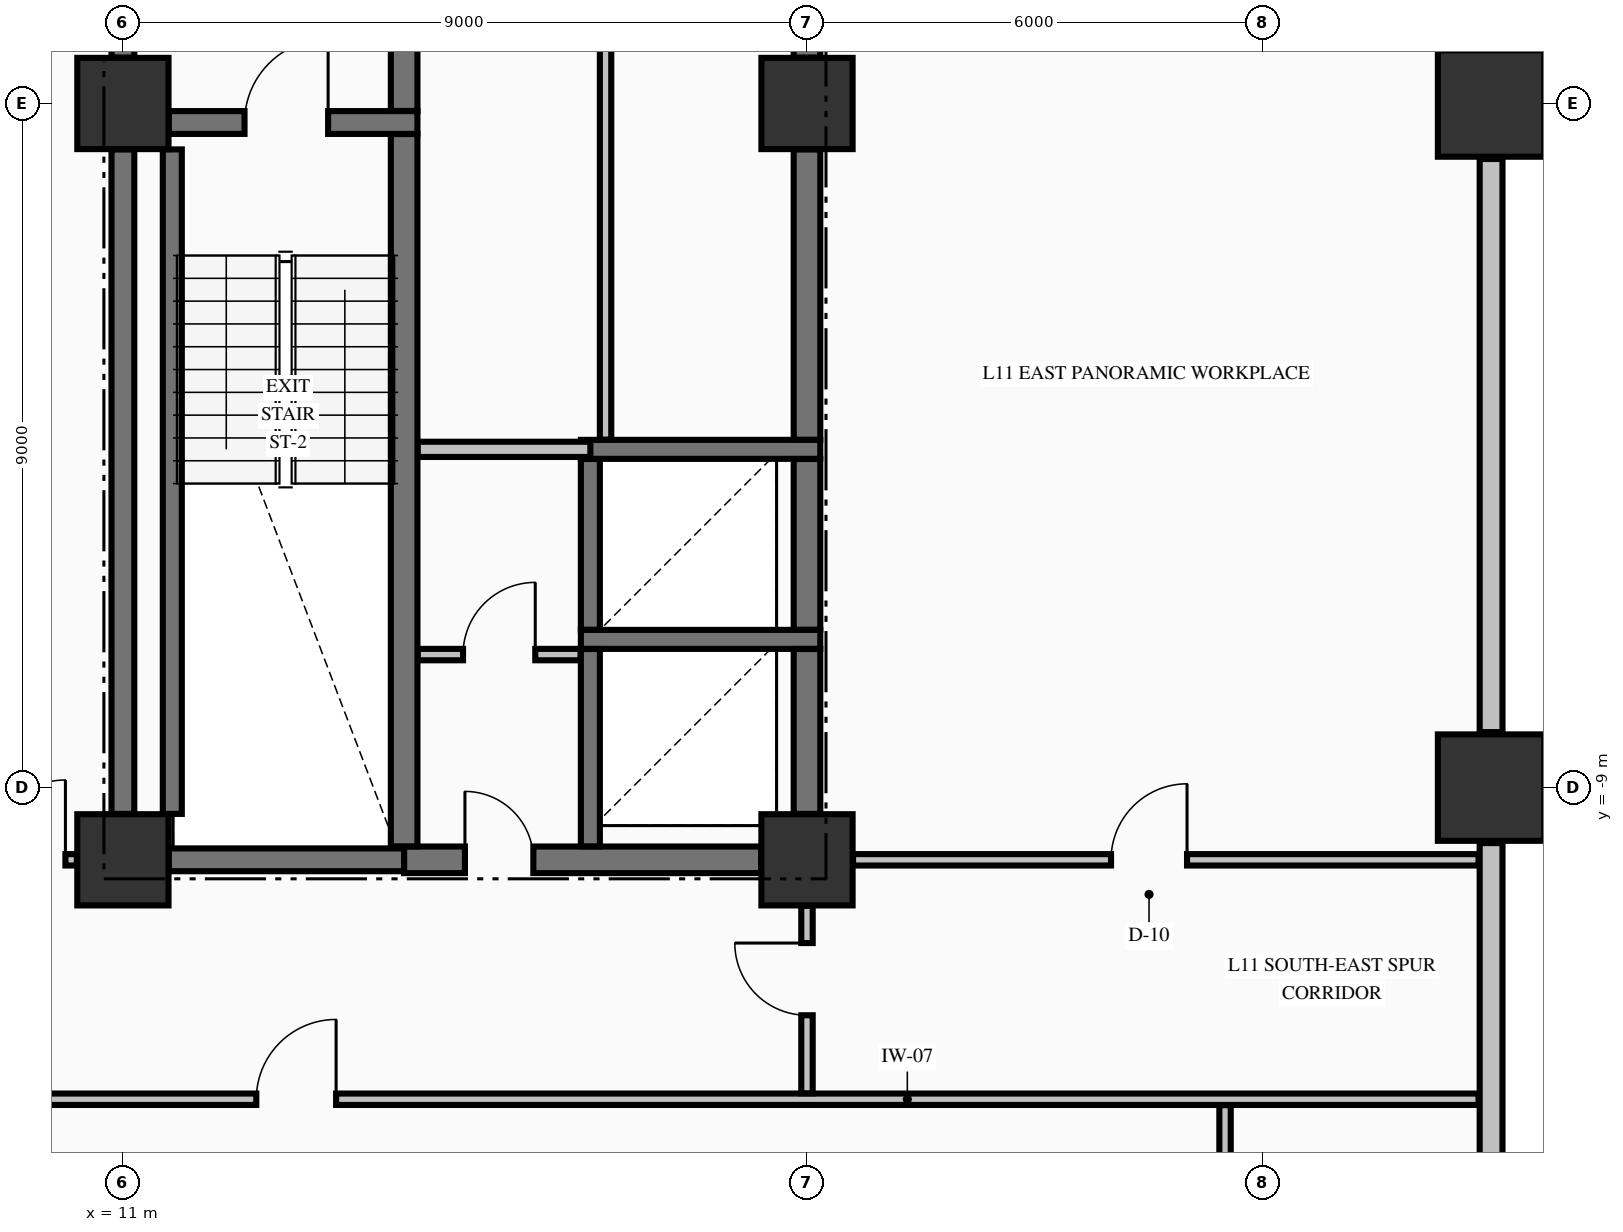
"""IFC4 building model, lengths in metres.
Left out: names, types, materials, properties, quantities, classifications, styles, units other than length and angle.
Written with IfcOpenShell. Run it as: python <this file> out.ifc"""

import sys

from ifc_helpers import new_model, si_unit, direction, frame, frame_2d, origin, origin_2d, place, context, subcontext, project, spatial, rectangle, extrude, element, fill, save


model = new_model("IFC4")
c1 = context("Model", 3, precision=1e-05, world=origin(), true_north=direction((0.0, 1.0)))
c2 = subcontext(c1, "Body", "Model", "MODEL_VIEW")
j1 = project(units=[si_unit("LENGTHUNIT", "METRE"), si_unit("PLANEANGLEUNIT", "RADIAN")], contexts=[c1])
p1 = place(None, origin())
s1 = spatial("IfcSite", under=j1, at=p1, CompositionType="ELEMENT")
p2 = place(p1, origin())
s2 = spatial("IfcBuilding", under=s1, at=p2, CompositionType="ELEMENT")
p3 = place(p2, frame((0.0, 0.0, 48.62)))
s3 = spatial("IfcBuildingStorey", under=s2, at=p3, CompositionType="ELEMENT", Elevation=48.62)
for number, where, z_axis, x_axis in (
    (1, (29.0, -9.0, -0.25), (0.0, 0.0, 1.0), (1.0, 0.0, 0.0)),
    (2, (29.0, 0.0, -0.25), (0.0, 0.0, 1.0), (1.0, 0.0, 0.0)),
):
    element("IfcColumn", number, at=place(p3, frame(where, z_axis=z_axis, x_axis=x_axis)), inside=s3, PredefinedType="COLUMN", context=c2, shape_type="SweptSolid", body=[
        extrude(rectangle(XDim=1.4, YDim=1.4, at=origin_2d()), origin(), (0.0, 0.0, 1.0), 3.395),
    ])
for number, where, z_axis, x_axis in (
    (3, (11.0, -9.95, -0.25), (0.0, 0.0, 1.0), (1.0, 0.0, 0.0)),
    (4, (11.0, 0.0, -0.25), (0.0, 0.0, 1.0), (1.0, 0.0, 0.0)),
    (5, (20.0, -9.95, -0.25), (0.0, 0.0, 1.0), (1.0, 0.0, 0.0)),
    (6, (20.0, 0.0, -0.25), (0.0, 0.0, 1.0), (1.0, 0.0, 0.0)),
):
    element("IfcColumn", number, at=place(p3, frame(where, z_axis=z_axis, x_axis=x_axis)), inside=s3, PredefinedType="COLUMN", context=c2, shape_type="SweptSolid", body=[
        extrude(rectangle(XDim=1.2, YDim=1.2, at=origin_2d()), origin(), (0.0, 0.0, 1.0), 3.395),
    ])
p4 = place(p3, frame((29.0, -22.27, 0.0), z_axis=(0.0, 0.0, 1.0), x_axis=(0.0, 1.0, 0.0)))
e7 = element("IfcWall", 7, at=p4, inside=s3, PredefinedType="STANDARD", context=c2, shape_type="SweptSolid", body=[
    extrude(rectangle(XDim=12.54, YDim=0.3, at=frame_2d((6.27, 0.0))), origin(), (0.0, 0.0, 1.0), 2.537),
])
p5 = place(p3, frame((29.0, -8.27, 0.0), z_axis=(0.0, 0.0, 1.0), x_axis=(0.0, 1.0, 0.0)))
e8 = element("IfcWall", 8, at=p5, inside=s3, PredefinedType="STANDARD", context=c2, shape_type="SweptSolid", body=[
    extrude(rectangle(XDim=7.54, YDim=0.3, at=frame_2d((3.77, 0.0))), origin(), (0.0, 0.0, 1.0), 2.537),
])
p6 = place(p3, frame((11.604, -9.95, 0.0), z_axis=(0.0, 0.0, 1.0), x_axis=(1.0, 0.0, 0.0)))
e9 = element("IfcWall", 9, at=p6, inside=s3, PredefinedType="SHEAR", context=c2, shape_type="SweptSolid", body=[
    extrude(rectangle(XDim=3.096, YDim=0.3, at=frame_2d((1.548, 0.0))), origin(), (0.0, 0.0, 1.0), 3.145),
])
p7 = place(p3, frame((14.7, -9.95, 0.0), z_axis=(0.0, 0.0, 1.0), x_axis=(1.0, 0.0, 0.0)))
e10 = element("IfcWall", 10, at=p7, inside=s3, PredefinedType="SHEAR", context=c2, shape_type="SweptSolid", body=[
    extrude(rectangle(XDim=4.696, YDim=0.35, at=frame_2d((2.348, 0.0))), origin(), (0.0, 0.0, 1.0), 3.145),
])
p8 = place(p7, frame((0.8, 0.0, 0.0)))
e11 = element("IfcOpeningElement", 11, at=p8, cuts=e10, PredefinedType="OPENING", context=c2, shape_type="SweptSolid", body=[
    extrude(rectangle(XDim=0.9, YDim=2.15, at=frame_2d((0.45, 1.075))), frame((0.0, 0.185, 0.0), z_axis=(0.0, -1.0, 0.0), x_axis=(1.0, 0.0, 0.0)), (0.0, 0.0, 1.0), 0.37),
])
for number, where, z_axis, x_axis in (
    (12, (17.025, -7.05, 0.0), (0.0, 0.0, 1.0), (1.0, 0.0, 0.0)),
    (13, (17.025, -4.55, 0.0), (0.0, 0.0, 1.0), (1.0, 0.0, 0.0)),
):
    element("IfcWall", number, at=place(p3, frame(where, z_axis=z_axis, x_axis=x_axis)), inside=s3, PredefinedType="SOLIDWALL", context=c2, shape_type="SweptSolid", body=[
        extrude(rectangle(XDim=3.15, YDim=0.25, at=frame_2d((1.575, 0.0))), origin(), (0.0, 0.0, 1.0), 3.145),
    ])
p9 = place(p3, frame((11.604, -0.25, 0.0), z_axis=(0.0, 0.0, 1.0), x_axis=(1.0, 0.0, 0.0)))
e14 = element("IfcWall", 14, at=p9, inside=s3, PredefinedType="SHEAR", context=c2, shape_type="SweptSolid", body=[
    extrude(rectangle(XDim=3.271, YDim=0.3, at=frame_2d((1.635, 0.0))), origin(), (0.0, 0.0, 1.0), 3.145),
])
p10 = place(p9, frame((0.996, 0.0, 0.0)))
e15 = element("IfcOpeningElement", 15, at=p10, cuts=e14, PredefinedType="OPENING", context=c2, shape_type="SweptSolid", body=[
    extrude(rectangle(XDim=1.1, YDim=2.15, at=frame_2d((0.55, 1.075))), frame((0.0, 0.16, 0.0), z_axis=(0.0, -1.0, 0.0), x_axis=(1.0, 0.0, 0.0)), (0.0, 0.0, 1.0), 0.32),
])
p11 = place(p3, frame((-23.835, -13.1, 0.0), z_axis=(0.0, 0.0, 1.0), x_axis=(1.0, 0.0, 0.0)))
e16 = element("IfcWall", 16, at=p11, inside=s3, PredefinedType="PARTITIONING", context=c2, shape_type="SweptSolid", body=[
    extrude(rectangle(XDim=52.67, YDim=0.15, at=frame_2d((26.335, 0.0))), origin(), (0.0, 0.0, 1.0), 3.145),
])
p12 = place(p11, frame((6.99, 0.0, 0.0)))
e17 = element("IfcOpeningElement", 17, at=p12, cuts=e16, PredefinedType="OPENING", context=c2, shape_type="SweptSolid", body=[
    extrude(rectangle(XDim=1.05, YDim=2.15, at=frame_2d((0.525, 1.075))), frame((0.0, 0.085, 0.0), z_axis=(0.0, -1.0, 0.0), x_axis=(1.0, 0.0, 0.0)), (0.0, 0.0, 1.0), 0.17),
])
p13 = place(p11, frame((15.26, 0.0, 0.0)))
e18 = element("IfcOpeningElement", 18, at=p13, cuts=e16, PredefinedType="OPENING", context=c2, shape_type="SweptSolid", body=[
    extrude(rectangle(XDim=1.05, YDim=2.15, at=frame_2d((0.525, 1.075))), frame((0.0, 0.085, 0.0), z_axis=(0.0, -1.0, 0.0), x_axis=(1.0, 0.0, 0.0)), (0.0, 0.0, 1.0), 0.17),
])
p14 = place(p11, frame((25.06, 0.0, 0.0)))
e19 = element("IfcOpeningElement", 19, at=p14, cuts=e16, PredefinedType="OPENING", context=c2, shape_type="SweptSolid", body=[
    extrude(rectangle(XDim=1.05, YDim=2.15, at=frame_2d((0.525, 1.075))), frame((0.0, 0.085, 0.0), z_axis=(0.0, -1.0, 0.0), x_axis=(1.0, 0.0, 0.0)), (0.0, 0.0, 1.0), 0.17),
])
p15 = place(p11, frame((36.59, 0.0, 0.0)))
e20 = element("IfcOpeningElement", 20, at=p15, cuts=e16, PredefinedType="OPENING", context=c2, shape_type="SweptSolid", body=[
    extrude(rectangle(XDim=1.05, YDim=2.15, at=frame_2d((0.525, 1.075))), frame((0.0, 0.085, 0.0), z_axis=(0.0, -1.0, 0.0), x_axis=(1.0, 0.0, 0.0)), (0.0, 0.0, 1.0), 0.17),
])
p16 = place(p3, frame((-10.394, -9.95, 0.0), z_axis=(0.0, 0.0, 1.0), x_axis=(1.0, 0.0, 0.0)))
e21 = element("IfcWall", 21, at=p16, inside=s3, PredefinedType="PARTITIONING", context=c2, shape_type="SweptSolid", body=[
    extrude(rectangle(XDim=20.788, YDim=0.15, at=frame_2d((10.394, 0.0))), origin(), (0.0, 0.0, 1.0), 3.145),
])
p17 = place(p16, frame((0.15, 0.0, 0.0)))
e22 = element("IfcOpeningElement", 22, at=p17, cuts=e21, PredefinedType="OPENING", context=c2, shape_type="SweptSolid", body=[
    extrude(rectangle(XDim=1.05, YDim=2.15, at=frame_2d((0.525, 1.075))), frame((0.0, 0.085, 0.0), z_axis=(0.0, -1.0, 0.0), x_axis=(1.0, 0.0, 0.0)), (0.0, 0.0, 1.0), 0.17),
])
p18 = place(p16, frame((19.588, 0.0, 0.0)))
e23 = element("IfcOpeningElement", 23, at=p18, cuts=e21, PredefinedType="OPENING", context=c2, shape_type="SweptSolid", body=[
    extrude(rectangle(XDim=1.05, YDim=2.15, at=frame_2d((0.525, 1.075))), frame((0.0, 0.085, 0.0), z_axis=(0.0, -1.0, 0.0), x_axis=(1.0, 0.0, 0.0)), (0.0, 0.0, 1.0), 0.17),
])
p19 = place(p16, frame((12.669, 0.0, 0.0)))
e24 = element("IfcOpeningElement", 24, at=p19, cuts=e21, PredefinedType="OPENING", context=c2, shape_type="SweptSolid", body=[
    extrude(rectangle(XDim=0.95, YDim=2.15, at=frame_2d((0.475, 1.075))), frame((0.0, 0.085, 0.0), z_axis=(0.0, -1.0, 0.0), x_axis=(1.0, 0.0, 0.0)), (0.0, 0.0, 1.0), 0.17),
])
p20 = place(p3, frame((20.606, -9.95, 0.0), z_axis=(0.0, 0.0, 1.0), x_axis=(1.0, 0.0, 0.0)))
e25 = element("IfcWall", 25, at=p20, inside=s3, PredefinedType="PARTITIONING", context=c2, shape_type="SweptSolid", body=[
    extrude(rectangle(XDim=8.229, YDim=0.15, at=frame_2d((4.115, 0.0))), origin(), (0.0, 0.0, 1.0), 3.145),
])
p21 = place(p20, frame((3.394, 0.0, 0.0)))
e26 = element("IfcOpeningElement", 26, at=p21, cuts=e25, PredefinedType="OPENING", context=c2, shape_type="SweptSolid", body=[
    extrude(rectangle(XDim=1.0, YDim=2.15, at=frame_2d((0.5, 1.075))), frame((0.0, 0.085, 0.0), z_axis=(0.0, -1.0, 0.0), x_axis=(1.0, 0.0, 0.0)), (0.0, 0.0, 1.0), 0.17),
])
p22 = place(p3, frame((14.878, -7.25, 0.0), z_axis=(0.0, 0.0, 1.0), x_axis=(1.0, 0.0, 0.0)))
e27 = element("IfcWall", 27, at=p22, inside=s3, PredefinedType="PARTITIONING", context=c2, shape_type="SweptSolid", body=[
    extrude(rectangle(XDim=2.144, YDim=0.15, at=frame_2d((1.072, 0.0))), origin(), (0.0, 0.0, 1.0), 3.145),
])
p23 = place(p22, frame((0.597, 0.0, 0.0)))
e28 = element("IfcOpeningElement", 28, at=p23, cuts=e27, PredefinedType="OPENING", context=c2, shape_type="SweptSolid", body=[
    extrude(rectangle(XDim=0.95, YDim=2.15, at=frame_2d((0.475, 1.075))), frame((0.0, 0.085, 0.0), z_axis=(0.0, -1.0, 0.0), x_axis=(1.0, 0.0, 0.0)), (0.0, 0.0, 1.0), 0.17),
])
p24 = place(p3, frame((14.878, -4.55, 0.0), z_axis=(0.0, 0.0, 1.0), x_axis=(1.0, 0.0, 0.0)))
e29 = element("IfcWall", 29, at=p24, inside=s3, PredefinedType="PARTITIONING", context=c2, shape_type="SweptSolid", body=[
    extrude(rectangle(XDim=2.272, YDim=0.2, at=frame_2d((1.136, 0.0))), origin(), (0.0, 0.0, 1.0), 3.145),
])
p25 = place(p3, frame((11.0, -9.346, 0.0), z_axis=(0.0, 0.0, 1.0), x_axis=(0.0, 1.0, 0.0)))
e30 = element("IfcWall", 30, at=p25, inside=s3, PredefinedType="SHEAR", context=c2, shape_type="SweptSolid", body=[
    extrude(rectangle(XDim=8.742, YDim=0.3, at=frame_2d((4.371, 0.0))), origin(), (0.0, 0.0, 1.0), 3.145),
])
p26 = place(p3, frame((11.0, 0.604, 0.0), z_axis=(0.0, 0.0, 1.0), x_axis=(0.0, 1.0, 0.0)))
e31 = element("IfcWall", 31, at=p26, inside=s3, PredefinedType="SHEAR", context=c2, shape_type="SweptSolid", body=[
    extrude(rectangle(XDim=2.144, YDim=0.3, at=frame_2d((1.072, 0.0))), origin(), (0.0, 0.0, 1.0), 3.145),
])
p27 = place(p26, frame((0.496, 0.0, 0.0)))
e32 = element("IfcOpeningElement", 32, at=p27, cuts=e31, PredefinedType="OPENING", context=c2, shape_type="SweptSolid", body=[
    extrude(rectangle(XDim=1.1, YDim=2.15, at=frame_2d((0.55, 1.075))), frame((0.0, 0.16, 0.0), z_axis=(0.0, -1.0, 0.0), x_axis=(1.0, 0.0, 0.0)), (0.0, 0.0, 1.0), 0.32),
])
p28 = place(p3, frame((11.65, -9.346, 0.0), z_axis=(0.0, 0.0, 1.0), x_axis=(0.0, 1.0, 0.0)))
e33 = element("IfcWall", 33, at=p28, inside=s3, PredefinedType="SOLIDWALL", context=c2, shape_type="SweptSolid", body=[
    extrude(rectangle(XDim=8.742, YDim=0.25, at=frame_2d((4.371, 0.0))), origin(), (0.0, 0.0, 1.0), 3.145),
])
p29 = place(p3, frame((14.7, -9.773, 0.0), z_axis=(0.0, 0.0, 1.0), x_axis=(0.0, 1.0, 0.0)))
e34 = element("IfcWall", 34, at=p29, inside=s3, PredefinedType="SHEAR", context=c2, shape_type="SweptSolid", body=[
    extrude(rectangle(XDim=9.371, YDim=0.35, at=frame_2d((4.686, 0.0))), origin(), (0.0, 0.0, 1.0), 3.145),
])
p30 = place(p3, frame((14.7, -0.098, 0.0), z_axis=(0.0, 0.0, 1.0), x_axis=(0.0, 1.0, 0.0)))
e35 = element("IfcWall", 35, at=p30, inside=s3, PredefinedType="SHEAR", context=c2, shape_type="SweptSolid", body=[
    extrude(rectangle(XDim=2.846, YDim=0.35, at=frame_2d((1.423, 0.0))), origin(), (0.0, 0.0, 1.0), 3.145),
])
p31 = place(p3, frame((17.15, -9.773, 0.0), z_axis=(0.0, 0.0, 1.0), x_axis=(0.0, 1.0, 0.0)))
e36 = element("IfcWall", 36, at=p31, inside=s3, PredefinedType="SOLIDWALL", context=c2, shape_type="SweptSolid", body=[
    extrude(rectangle(XDim=2.596, YDim=0.25, at=frame_2d((1.298, 0.0))), origin(), (0.0, 0.0, 1.0), 3.145),
])
p32 = place(p3, frame((17.15, -6.923, 0.0), z_axis=(0.0, 0.0, 1.0), x_axis=(0.0, 1.0, 0.0)))
e37 = element("IfcWall", 37, at=p32, inside=s3, PredefinedType="SOLIDWALL", context=c2, shape_type="SweptSolid", body=[
    extrude(rectangle(XDim=2.246, YDim=0.25, at=frame_2d((1.123, 0.0))), origin(), (0.0, 0.0, 1.0), 3.145),
])
p33 = place(p3, frame((20.0, -9.346, 0.0), z_axis=(0.0, 0.0, 1.0), x_axis=(0.0, 1.0, 0.0)))
e38 = element("IfcWall", 38, at=p33, inside=s3, PredefinedType="SHEAR", context=c2, shape_type="SweptSolid", body=[
    extrude(rectangle(XDim=2.169, YDim=0.35, at=frame_2d((1.084, 0.0))), origin(), (0.0, 0.0, 1.0), 3.145),
])
p34 = place(p3, frame((20.0, -6.923, 0.0), z_axis=(0.0, 0.0, 1.0), x_axis=(0.0, 1.0, 0.0)))
e39 = element("IfcWall", 39, at=p34, inside=s3, PredefinedType="SHEAR", context=c2, shape_type="SweptSolid", body=[
    extrude(rectangle(XDim=2.246, YDim=0.35, at=frame_2d((1.123, 0.0))), origin(), (0.0, 0.0, 1.0), 3.145),
])
p35 = place(p3, frame((20.0, -4.423, 0.0), z_axis=(0.0, 0.0, 1.0), x_axis=(0.0, 1.0, 0.0)))
e40 = element("IfcWall", 40, at=p35, inside=s3, PredefinedType="SHEAR", context=c2, shape_type="SweptSolid", body=[
    extrude(rectangle(XDim=3.819, YDim=0.35, at=frame_2d((1.91, 0.0))), origin(), (0.0, 0.0, 1.0), 3.145),
])
p36 = place(p3, frame((20.0, 0.604, 0.0), z_axis=(0.0, 0.0, 1.0), x_axis=(0.0, 1.0, 0.0)))
e41 = element("IfcWall", 41, at=p36, inside=s3, PredefinedType="SHEAR", context=c2, shape_type="SweptSolid", body=[
    extrude(rectangle(XDim=9.292, YDim=0.35, at=frame_2d((4.646, 0.0))), origin(), (0.0, 0.0, 1.0), 3.145),
])
p37 = place(p3, frame((17.35, -4.422, 0.0), z_axis=(0.0, 0.0, 1.0), x_axis=(0.0, 1.0, 0.0)))
e42 = element("IfcWall", 42, at=p37, inside=s3, PredefinedType="PARTITIONING", context=c2, shape_type="SweptSolid", body=[
    extrude(rectangle(XDim=14.744, YDim=0.15, at=frame_2d((7.372, 0.0))), origin(), (0.0, 0.0, 1.0), 3.145),
])
p38 = place(p3, frame((20.0, -13.022, 0.0), z_axis=(0.0, 0.0, 1.0), x_axis=(0.0, 1.0, 0.0)))
e43 = element("IfcWall", 43, at=p38, inside=s3, PredefinedType="PARTITIONING", context=c2, shape_type="SweptSolid", body=[
    extrude(rectangle(XDim=2.466, YDim=0.15, at=frame_2d((1.233, 0.0))), origin(), (0.0, 0.0, 1.0), 2.485),
])
p39 = place(p38, frame((1.027, 0.0, 0.0)))
e44 = element("IfcOpeningElement", 44, at=p39, cuts=e43, PredefinedType="OPENING", context=c2, shape_type="SweptSolid", body=[
    extrude(rectangle(XDim=0.95, YDim=2.15, at=frame_2d((0.475, 1.075))), frame((0.0, 0.085, 0.0), z_axis=(0.0, -1.0, 0.0), x_axis=(1.0, 0.0, 0.0)), (0.0, 0.0, 1.0), 0.17),
])
p40 = place(p3, frame((25.5, -22.294, 0.0), z_axis=(0.0, 0.0, 1.0), x_axis=(0.0, 1.0, 0.0)))
e45 = element("IfcWall", 45, at=p40, inside=s3, PredefinedType="PARTITIONING", context=c2, shape_type="SweptSolid", body=[
    extrude(rectangle(XDim=9.116, YDim=0.15, at=frame_2d((4.558, 0.0))), origin(), (0.0, 0.0, 1.0), 3.145),
])
p41 = place(p10, origin())
e46 = element("IfcDoor", 46, at=p41, inside=s3, OperationType="SINGLE_SWING_RIGHT", PredefinedType="DOOR", context=c2, shape_type="SweptSolid", body=[
    extrude(rectangle(XDim=1.1, YDim=2.15, at=frame_2d((0.55, 1.075))), frame((0.0, 0.025, 0.0), z_axis=(0.0, -1.0, 0.0), x_axis=(1.0, 0.0, 0.0)), (0.0, 0.0, 1.0), 0.05),
])
fill(e15, e46)
p42 = place(p8, origin())
e47 = element("IfcDoor", 47, at=p42, inside=s3, OperationType="SINGLE_SWING_LEFT", PredefinedType="DOOR", context=c2, shape_type="SweptSolid", body=[
    extrude(rectangle(XDim=0.9, YDim=2.15, at=frame_2d((0.45, 1.075))), frame((0.0, 0.025, 0.0), z_axis=(0.0, -1.0, 0.0), x_axis=(1.0, 0.0, 0.0)), (0.0, 0.0, 1.0), 0.05),
])
fill(e11, e47)
p43 = place(p23, origin())
e48 = element("IfcDoor", 48, at=p43, inside=s3, OperationType="SINGLE_SWING_RIGHT", PredefinedType="DOOR", context=c2, shape_type="SweptSolid", body=[
    extrude(rectangle(XDim=0.95, YDim=2.15, at=frame_2d((0.475, 1.075))), frame((0.0, 0.025, 0.0), z_axis=(0.0, -1.0, 0.0), x_axis=(1.0, 0.0, 0.0)), (0.0, 0.0, 1.0), 0.05),
])
fill(e28, e48)
p44 = place(p18, origin())
e49 = element("IfcDoor", 49, at=p44, inside=s3, OperationType="SINGLE_SWING_RIGHT", PredefinedType="DOOR", context=c2, shape_type="SweptSolid", body=[
    extrude(rectangle(XDim=1.05, YDim=2.15, at=frame_2d((0.525, 1.075))), frame((0.0, 0.025, 0.0), z_axis=(0.0, -1.0, 0.0), x_axis=(1.0, 0.0, 0.0)), (0.0, 0.0, 1.0), 0.05),
])
fill(e23, e49)
p45 = place(p15, origin())
e50 = element("IfcDoor", 50, at=p45, inside=s3, OperationType="SINGLE_SWING_RIGHT", PredefinedType="DOOR", context=c2, shape_type="SweptSolid", body=[
    extrude(rectangle(XDim=1.05, YDim=2.15, at=frame_2d((0.525, 1.075))), frame((0.0, 0.025, 0.0), z_axis=(0.0, -1.0, 0.0), x_axis=(1.0, 0.0, 0.0)), (0.0, 0.0, 1.0), 0.05),
])
fill(e20, e50)
p46 = place(p39, origin())
e51 = element("IfcDoor", 51, at=p46, inside=s3, OperationType="SINGLE_SWING_RIGHT", PredefinedType="DOOR", context=c2, shape_type="SweptSolid", body=[
    extrude(rectangle(XDim=0.95, YDim=2.15, at=frame_2d((0.475, 1.075))), frame((0.0, 0.025, 0.0), z_axis=(0.0, -1.0, 0.0), x_axis=(1.0, 0.0, 0.0)), (0.0, 0.0, 1.0), 0.05),
])
fill(e44, e51)
p47 = place(p21, origin())
e52 = element("IfcDoor", 52, at=p47, inside=s3, OperationType="SINGLE_SWING_RIGHT", PredefinedType="DOOR", context=c2, shape_type="SweptSolid", body=[
    extrude(rectangle(XDim=1.0, YDim=2.15, at=frame_2d((0.5, 1.075))), frame((0.0, 0.025, 0.0), z_axis=(0.0, -1.0, 0.0), x_axis=(1.0, 0.0, 0.0)), (0.0, 0.0, 1.0), 0.05),
])
fill(e26, e52)
save(model, sys.argv[1])
